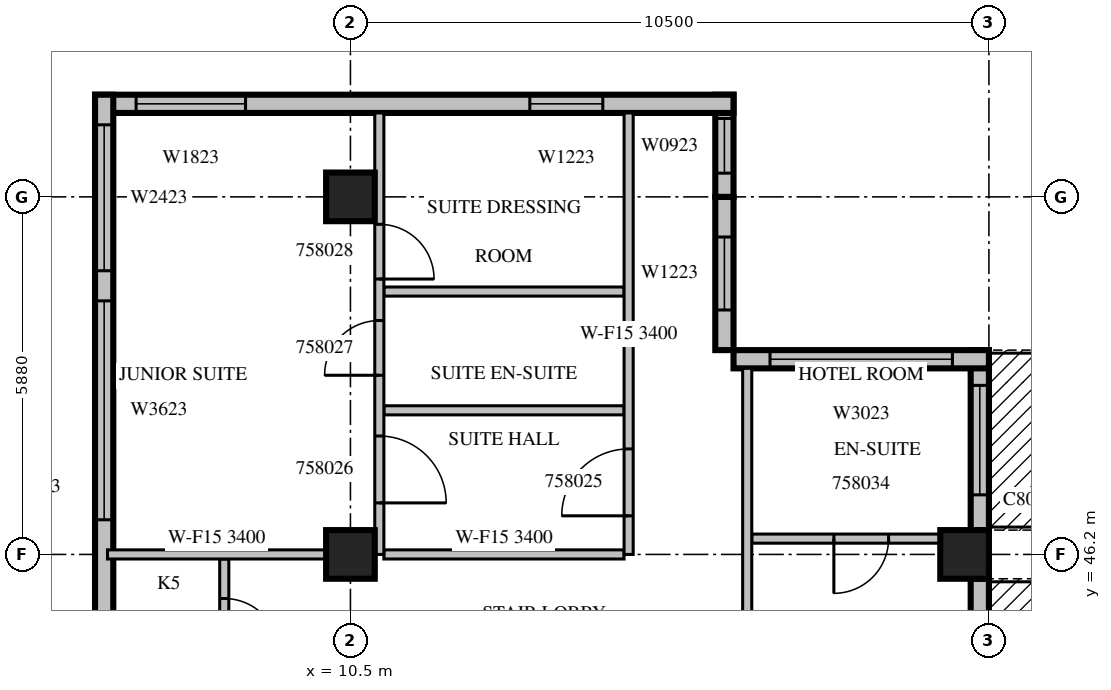
"""IFC4 building model, lengths in metres.
Left out: names, types, materials, properties, quantities, classifications, styles, units other than length and angle.
Written with IfcOpenShell. Run it as: python <this file> out.ifc"""

import sys

from ifc_helpers import new_model, si_unit, direction, frame, frame_2d, origin, origin_2d, place, context, subcontext, project, spatial, rectangle, extrude, source, transform, mapped, element, fill, save


model = new_model("IFC4")
c1 = context("Model", 3, precision=1e-05, world=origin(), true_north=direction((0.0, 1.0)))
c2 = subcontext(c1, "Body", "Model", "MODEL_VIEW")
j1 = project(units=[si_unit("LENGTHUNIT", "METRE"), si_unit("PLANEANGLEUNIT", "RADIAN")], contexts=[c1])
p1 = place(None, origin())
s1 = spatial("IfcSite", under=j1, at=p1, CompositionType="ELEMENT")
p2 = place(p1, origin())
s2 = spatial("IfcBuilding", under=s1, at=p2, CompositionType="ELEMENT")
p3 = place(p2, frame((0.0, 0.0, 253.8)))
s3 = spatial("IfcBuildingStorey", under=s2, at=p3, CompositionType="ELEMENT", Elevation=253.8)
m1 = source(origin(), c2, "Body", "SweptSolid", [
    extrude(rectangle(XDim=0.8, YDim=0.8, at=origin_2d()), origin(), (0.0, 0.0, 1.0), 3.8),
])
for number, where, z_axis, x_axis in (
    (1, (10.5, 46.2, 0.0), (0.0, 0.0, 1.0), (1.0, 0.0, 0.0)),
    (2, (20.6, 46.2, 0.0), (0.0, 0.0, 1.0), (1.0, 0.0, 0.0)),
    (3, (10.5, 52.08, 0.0), (0.0, 0.0, 1.0), (1.0, 0.0, 0.0)),
):
    element("IfcColumn", number, at=place(p3, frame(where, z_axis=z_axis, x_axis=x_axis)), inside=s3, PredefinedType="COLUMN", context=c2, shape_type="MappedRepresentation", body=[
        mapped(m1, transform((0.0, 0.0, 0.0), scale=1.0)),
    ])
m2 = source(origin(), c2, "Body", "SweptSolid", [
    extrude(rectangle(XDim=3.8, YDim=0.3, at=frame_2d((1.9, 0.0))), origin(), (0.0, 0.0, 1.0), 3.4),
])
p4 = place(p3, frame((20.85, 42.0, 0.0), z_axis=(0.0, 0.0, 1.0), x_axis=(0.0, 1.0, 0.0)))
e4 = element("IfcWall", 4, at=p4, inside=s3, PredefinedType="STANDARD", context=c2, shape_type="MappedRepresentation", body=[
    mapped(m2, transform((0.0, 0.0, 0.0), scale=1.0)),
])
m3 = source(origin(), c2, "Body", "SweptSolid", [
    extrude(rectangle(XDim=1.8, YDim=2.4, at=frame_2d((0.9, 1.2))), frame((0.0, 0.16, 0.0), z_axis=(0.0, -1.0, 0.0), x_axis=(1.0, 0.0, 0.0)), (0.0, 0.0, 1.0), 0.32),
])
p5 = place(p4, frame((1.0, 0.0, 0.0)))
e5 = element("IfcOpeningElement", 5, at=p5, cuts=e4, PredefinedType="OPENING", context=c2, shape_type="MappedRepresentation", body=[
    mapped(m3, transform((0.0, 0.0, 0.0), scale=1.0)),
])
m4 = source(origin(), c2, "Body", "SweptSolid", [
    extrude(rectangle(XDim=2.96, YDim=0.3, at=frame_2d((1.48, 0.0))), origin(), (0.0, 0.0, 1.0), 3.4),
])
p6 = place(p3, frame((20.85, 46.6, 0.0), z_axis=(0.0, 0.0, 1.0), x_axis=(0.0, 1.0, 0.0)))
e6 = element("IfcWall", 6, at=p6, inside=s3, PredefinedType="STANDARD", context=c2, shape_type="MappedRepresentation", body=[
    mapped(m4, transform((0.0, 0.0, 0.0), scale=1.0)),
])
p7 = place(p6, frame((0.58, 0.0, 0.0)))
e7 = element("IfcOpeningElement", 7, at=p7, cuts=e6, PredefinedType="OPENING", context=c2, shape_type="MappedRepresentation", body=[
    mapped(m3, transform((0.0, 0.0, 0.0), scale=1.0)),
])
m5 = source(origin(), c2, "Body", "SweptSolid", [
    extrude(rectangle(XDim=4.2, YDim=0.3, at=frame_2d((2.1, 0.0))), origin(), (0.0, 0.0, 1.0), 3.4),
])
p8 = place(p3, frame((21.0, 49.41, 0.0), z_axis=(0.0, 0.0, 1.0), x_axis=(-1.0, 0.0, 0.0)))
e8 = element("IfcWall", 8, at=p8, inside=s3, PredefinedType="STANDARD", context=c2, shape_type="MappedRepresentation", body=[
    mapped(m5, transform((0.0, 0.0, 0.0), scale=1.0)),
])
m6 = source(origin(), c2, "Body", "SweptSolid", [
    extrude(rectangle(XDim=3.0, YDim=2.3, at=frame_2d((1.5, 1.15))), frame((0.0, 0.16, 0.0), z_axis=(0.0, -1.0, 0.0), x_axis=(1.0, 0.0, 0.0)), (0.0, 0.0, 1.0), 0.32),
])
p9 = place(p8, frame((0.6, 0.0, 0.6)))
e9 = element("IfcOpeningElement", 9, at=p9, cuts=e8, PredefinedType="OPENING", context=c2, shape_type="MappedRepresentation", body=[
    mapped(m6, transform((0.0, 0.0, 0.0), scale=1.0)),
])
m7 = source(origin(), c2, "Body", "SweptSolid", [
    extrude(rectangle(XDim=2.52, YDim=0.3, at=frame_2d((1.26, 0.0))), origin(), (0.0, 0.0, 1.0), 3.4),
])
p10 = place(p3, frame((16.65, 49.56, 0.0), z_axis=(0.0, 0.0, 1.0), x_axis=(0.0, 1.0, 0.0)))
e10 = element("IfcWall", 10, at=p10, inside=s3, PredefinedType="STANDARD", context=c2, shape_type="MappedRepresentation", body=[
    mapped(m7, transform((0.0, 0.0, 0.0), scale=1.0)),
])
m8 = source(origin(), c2, "Body", "SweptSolid", [
    extrude(rectangle(XDim=1.2, YDim=2.3, at=frame_2d((0.6, 1.15))), frame((0.0, 0.16, 0.0), z_axis=(0.0, -1.0, 0.0), x_axis=(1.0, 0.0, 0.0)), (0.0, 0.0, 1.0), 0.32),
])
p11 = place(p10, frame((0.66, 0.0, 0.6)))
e11 = element("IfcOpeningElement", 11, at=p11, cuts=e10, PredefinedType="OPENING", context=c2, shape_type="MappedRepresentation", body=[
    mapped(m8, transform((0.0, 0.0, 0.0), scale=1.0)),
])
m9 = source(origin(), c2, "Body", "SweptSolid", [
    extrude(rectangle(XDim=1.68, YDim=0.3, at=frame_2d((0.84, 0.0))), origin(), (0.0, 0.0, 1.0), 3.4),
])
p12 = place(p3, frame((16.65, 52.08, 0.0), z_axis=(0.0, 0.0, 1.0), x_axis=(0.0, 1.0, 0.0)))
e12 = element("IfcWall", 12, at=p12, inside=s3, PredefinedType="STANDARD", context=c2, shape_type="MappedRepresentation", body=[
    mapped(m9, transform((0.0, 0.0, 0.0), scale=1.0)),
])
m10 = source(origin(), c2, "Body", "SweptSolid", [
    extrude(rectangle(XDim=0.9, YDim=2.3, at=frame_2d((0.45, 1.15))), frame((0.0, 0.16, 0.0), z_axis=(0.0, -1.0, 0.0), x_axis=(1.0, 0.0, 0.0)), (0.0, 0.0, 1.0), 0.32),
])
p13 = place(p12, frame((0.39, 0.0, 0.6)))
e13 = element("IfcOpeningElement", 13, at=p13, cuts=e12, PredefinedType="OPENING", context=c2, shape_type="MappedRepresentation", body=[
    mapped(m10, transform((0.0, 0.0, 0.0), scale=1.0)),
])
m11 = source(origin(), c2, "Body", "SweptSolid", [
    extrude(rectangle(XDim=10.5, YDim=0.3, at=frame_2d((5.25, 0.0))), origin(), (0.0, 0.0, 1.0), 3.4),
])
p14 = place(p3, frame((16.8, 53.61, 0.0), z_axis=(0.0, 0.0, 1.0), x_axis=(-1.0, 0.0, 0.0)))
e14 = element("IfcWall", 14, at=p14, inside=s3, PredefinedType="STANDARD", context=c2, shape_type="MappedRepresentation", body=[
    mapped(m11, transform((0.0, 0.0, 0.0), scale=1.0)),
])
p15 = place(p14, frame((2.15, 0.0, 0.6)))
e15 = element("IfcOpeningElement", 15, at=p15, cuts=e14, PredefinedType="OPENING", context=c2, shape_type="MappedRepresentation", body=[
    mapped(m8, transform((0.0, 0.0, 0.0), scale=1.0)),
])
m12 = source(origin(), c2, "Body", "SweptSolid", [
    extrude(rectangle(XDim=1.8, YDim=2.3, at=frame_2d((0.9, 1.15))), frame((0.0, 0.16, 0.0), z_axis=(0.0, -1.0, 0.0), x_axis=(1.0, 0.0, 0.0)), (0.0, 0.0, 1.0), 0.32),
])
p16 = place(p14, frame((8.025, 0.0, 0.6)))
e16 = element("IfcOpeningElement", 16, at=p16, cuts=e14, PredefinedType="OPENING", context=c2, shape_type="MappedRepresentation", body=[
    mapped(m12, transform((0.0, 0.0, 0.0), scale=1.0)),
])
m13 = source(origin(), c2, "Body", "SweptSolid", [
    extrude(rectangle(XDim=9.91, YDim=0.3, at=frame_2d((4.955, 0.0))), origin(), (0.0, 0.0, 1.0), 3.4),
])
p17 = place(p3, frame((6.45, 53.76, 0.0), z_axis=(0.0, 0.0, 1.0), x_axis=(0.0, -1.0, 0.0)))
e17 = element("IfcWall", 17, at=p17, inside=s3, PredefinedType="STANDARD", context=c2, shape_type="MappedRepresentation", body=[
    mapped(m13, transform((0.0, 0.0, 0.0), scale=1.0)),
])
m14 = source(origin(), c2, "Body", "SweptSolid", [
    extrude(rectangle(XDim=3.6, YDim=2.3, at=frame_2d((1.8, 1.15))), frame((0.0, 0.16, 0.0), z_axis=(0.0, -1.0, 0.0), x_axis=(1.0, 0.0, 0.0)), (0.0, 0.0, 1.0), 0.32),
])
p18 = place(p17, frame((3.39, 0.0, 0.6)))
e18 = element("IfcOpeningElement", 18, at=p18, cuts=e17, PredefinedType="OPENING", context=c2, shape_type="MappedRepresentation", body=[
    mapped(m14, transform((0.0, 0.0, 0.0), scale=1.0)),
])
m15 = source(origin(), c2, "Body", "SweptSolid", [
    extrude(rectangle(XDim=2.4, YDim=2.3, at=frame_2d((1.2, 1.15))), frame((0.0, 0.16, 0.0), z_axis=(0.0, -1.0, 0.0), x_axis=(1.0, 0.0, 0.0)), (0.0, 0.0, 1.0), 0.32),
])
p19 = place(p17, frame((0.495, 0.0, 0.6)))
e19 = element("IfcOpeningElement", 19, at=p19, cuts=e17, PredefinedType="OPENING", context=c2, shape_type="MappedRepresentation", body=[
    mapped(m15, transform((0.0, 0.0, 0.0), scale=1.0)),
])
m16 = source(origin(), c2, "Body", "SweptSolid", [
    extrude(rectangle(XDim=2.2, YDim=0.15, at=frame_2d((1.1, 0.0))), origin(), (0.0, 0.0, 1.0), 3.4),
])
p20 = place(p3, frame((8.425, 43.925, 0.0), z_axis=(0.0, 0.0, 1.0), x_axis=(0.0, 1.0, 0.0)))
e20 = element("IfcWall", 20, at=p20, inside=s3, PredefinedType="PARTITIONING", context=c2, shape_type="MappedRepresentation", body=[
    mapped(m16, transform((0.0, 0.0, 0.0), scale=1.0)),
])
m17 = source(origin(), c2, "Body", "SweptSolid", [
    extrude(rectangle(XDim=0.9, YDim=2.1, at=frame_2d((0.45, 1.05))), frame((0.0, 0.085, 0.0), z_axis=(0.0, -1.0, 0.0), x_axis=(1.0, 0.0, 0.0)), (0.0, 0.0, 1.0), 0.17),
])
p21 = place(p20, frame((0.65, 0.0, 0.0)))
e21 = element("IfcOpeningElement", 21, at=p21, cuts=e20, PredefinedType="OPENING", context=c2, shape_type="MappedRepresentation", body=[
    mapped(m17, transform((0.0, 0.0, 0.0), scale=1.0)),
])
m18 = source(origin(), c2, "Body", "SweptSolid", [
    extrude(rectangle(XDim=3.95, YDim=0.15, at=frame_2d((1.975, 0.0))), origin(), (0.0, 0.0, 1.0), 3.4),
])
for number, where, z_axis, x_axis in (
    (22, (15.0, 48.57, 0.0), (0.0, 0.0, 1.0), (-1.0, 0.0, 0.0)),
    (23, (15.0, 50.523, 0.0), (0.0, 0.0, 1.0), (-1.0, 0.0, 0.0)),
):
    element("IfcWall", number, at=place(p3, frame(where, z_axis=z_axis, x_axis=x_axis)), inside=s3, PredefinedType="PARTITIONING", context=c2, shape_type="MappedRepresentation", body=[
        mapped(m18, transform((0.0, 0.0, 0.0), scale=1.0)),
    ])
m19 = source(origin(), c2, "Body", "SweptSolid", [
    extrude(rectangle(XDim=3.596, YDim=0.15, at=frame_2d((1.798, 0.0))), origin(), (0.0, 0.0, 1.0), 3.4),
])
p22 = place(p3, frame((10.101, 46.2, 0.0), z_axis=(0.0, 0.0, 1.0), x_axis=(-1.0, 0.0, 0.0)))
e24 = element("IfcWall", 24, at=p22, inside=s3, PredefinedType="PARTITIONING", context=c2, shape_type="MappedRepresentation", body=[
    mapped(m19, transform((0.0, 0.0, 0.0), scale=1.0)),
])
p23 = place(p3, frame((15.0, 46.2, 0.0), z_axis=(0.0, 0.0, 1.0), x_axis=(-1.0, 0.0, 0.0)))
e25 = element("IfcWall", 25, at=p23, inside=s3, PredefinedType="PARTITIONING", context=c2, shape_type="MappedRepresentation", body=[
    mapped(m18, transform((0.0, 0.0, 0.0), scale=1.0)),
])
m20 = source(origin(), c2, "Body", "SweptSolid", [
    extrude(rectangle(XDim=7.26, YDim=0.15, at=frame_2d((3.63, 0.0))), origin(), (0.0, 0.0, 1.0), 3.4),
])
p24 = place(p3, frame((10.975, 46.2, 0.0), z_axis=(0.0, 0.0, 1.0), x_axis=(0.0, 1.0, 0.0)))
e26 = element("IfcWall", 26, at=p24, inside=s3, PredefinedType="PARTITIONING", context=c2, shape_type="MappedRepresentation", body=[
    mapped(m20, transform((0.0, 0.0, 0.0), scale=1.0)),
])
m21 = source(origin(), c2, "Body", "SweptSolid", [
    extrude(rectangle(XDim=1.1, YDim=2.1, at=frame_2d((0.55, 1.05))), frame((0.0, 0.085, 0.0), z_axis=(0.0, -1.0, 0.0), x_axis=(1.0, 0.0, 0.0)), (0.0, 0.0, 1.0), 0.17),
])
p25 = place(p24, frame((0.847, 0.0, 0.0)))
e27 = element("IfcOpeningElement", 27, at=p25, cuts=e26, PredefinedType="OPENING", context=c2, shape_type="MappedRepresentation", body=[
    mapped(m21, transform((0.0, 0.0, 0.0), scale=1.0)),
])
p26 = place(p24, frame((2.946, 0.0, 0.0)))
e28 = element("IfcOpeningElement", 28, at=p26, cuts=e26, PredefinedType="OPENING", context=c2, shape_type="MappedRepresentation", body=[
    mapped(m17, transform((0.0, 0.0, 0.0), scale=1.0)),
])
p27 = place(p24, frame((4.529, 0.0, 0.0)))
e29 = element("IfcOpeningElement", 29, at=p27, cuts=e26, PredefinedType="OPENING", context=c2, shape_type="MappedRepresentation", body=[
    mapped(m17, transform((0.0, 0.0, 0.0), scale=1.0)),
])
m22 = source(origin(), c2, "Body", "SweptSolid", [
    extrude(rectangle(XDim=3.101, YDim=0.15, at=frame_2d((1.55, 0.0))), origin(), (0.0, 0.0, 1.0), 3.4),
])
p28 = place(p3, frame((17.1, 46.46, 0.0), z_axis=(0.0, 0.0, 1.0), x_axis=(1.0, 0.0, 0.0)))
e30 = element("IfcWall", 30, at=p28, inside=s3, PredefinedType="PARTITIONING", context=c2, shape_type="MappedRepresentation", body=[
    mapped(m22, transform((0.0, 0.0, 0.0), scale=1.0)),
])
p29 = place(p28, frame((1.35, 0.0, 0.0)))
e31 = element("IfcOpeningElement", 31, at=p29, cuts=e30, PredefinedType="OPENING", context=c2, shape_type="MappedRepresentation", body=[
    mapped(m17, transform((0.0, 0.0, 0.0), scale=1.0)),
])
p30 = place(p3, frame((15.075, 46.2, 0.0), z_axis=(0.0, 0.0, 1.0), x_axis=(0.0, 1.0, 0.0)))
e32 = element("IfcWall", 32, at=p30, inside=s3, PredefinedType="PARTITIONING", context=c2, shape_type="MappedRepresentation", body=[
    mapped(m20, transform((0.0, 0.0, 0.0), scale=1.0)),
])
p31 = place(p30, frame((0.635, 0.0, 0.0)))
e33 = element("IfcOpeningElement", 33, at=p31, cuts=e32, PredefinedType="OPENING", context=c2, shape_type="MappedRepresentation", body=[
    mapped(m21, transform((0.0, 0.0, 0.0), scale=1.0)),
])
m23 = source(origin(), c2, "Body", "SweptSolid", [
    extrude(rectangle(XDim=19.86, YDim=0.15, at=frame_2d((9.93, 0.0))), origin(), (0.0, 0.0, 1.0), 2.9),
])
p32 = place(p3, frame((17.025, 49.26, 0.0), z_axis=(0.0, 0.0, 1.0), x_axis=(0.0, -1.0, 0.0)))
e34 = element("IfcWall", 34, at=p32, inside=s3, PredefinedType="PARTITIONING", context=c2, shape_type="MappedRepresentation", body=[
    mapped(m23, transform((0.0, 0.0, 0.0), scale=1.0)),
])
p33 = place(p32, frame((18.076, 0.0, 0.0)))
e35 = element("IfcOpeningElement", 35, at=p33, cuts=e34, PredefinedType="OPENING", context=c2, shape_type="MappedRepresentation", body=[
    mapped(m17, transform((0.0, 0.0, 0.0), scale=1.0)),
])
p34 = place(p32, frame((15.976, 0.0, 0.0)))
e36 = element("IfcOpeningElement", 36, at=p34, cuts=e34, PredefinedType="OPENING", context=c2, shape_type="MappedRepresentation", body=[
    mapped(m17, transform((0.0, 0.0, 0.0), scale=1.0)),
])
p35 = place(p32, frame((13.913, 0.0, 0.0)))
e37 = element("IfcOpeningElement", 37, at=p35, cuts=e34, PredefinedType="OPENING", context=c2, shape_type="MappedRepresentation", body=[
    mapped(m17, transform((0.0, 0.0, 0.0), scale=1.0)),
])
p36 = place(p32, frame((11.813, 0.0, 0.0)))
e38 = element("IfcOpeningElement", 38, at=p36, cuts=e34, PredefinedType="OPENING", context=c2, shape_type="MappedRepresentation", body=[
    mapped(m17, transform((0.0, 0.0, 0.0), scale=1.0)),
])
m24 = source(origin(), c2, "Body", "SweptSolid", [
    extrude(rectangle(XDim=1.0, YDim=2.1, at=frame_2d((0.5, 1.05))), frame((0.0, 0.085, 0.0), z_axis=(0.0, -1.0, 0.0), x_axis=(1.0, 0.0, 0.0)), (0.0, 0.0, 1.0), 0.17),
])
p37 = place(p32, frame((6.63, 0.0, 0.0)))
e39 = element("IfcOpeningElement", 39, at=p37, cuts=e34, PredefinedType="OPENING", context=c2, shape_type="MappedRepresentation", body=[
    mapped(m24, transform((0.0, 0.0, 0.0), scale=1.0)),
])
m25 = source(origin(), c2, "Body", "SweptSolid", [
    extrude(rectangle(XDim=1.8, YDim=2.4, at=frame_2d((0.9, 1.2))), frame((0.0, 0.025, 0.0), z_axis=(0.0, -1.0, 0.0), x_axis=(1.0, 0.0, 0.0)), (0.0, 0.0, 1.0), 0.05),
])
p38 = place(p7, origin())
e40 = element("IfcDoor", 40, at=p38, inside=s3, OperationType="SLIDING_TO_LEFT", PredefinedType="DOOR", context=c2, shape_type="MappedRepresentation", body=[
    mapped(m25, transform((0.0, 0.0, 0.0), scale=1.0)),
])
fill(e7, e40)
m26 = source(origin(), c2, "Body", "SweptSolid", [
    extrude(rectangle(XDim=3.0, YDim=2.3, at=frame_2d((1.5, 1.15))), frame((0.0, 0.03, 0.0), z_axis=(0.0, -1.0, 0.0), x_axis=(1.0, 0.0, 0.0)), (0.0, 0.0, 1.0), 0.06),
])
p39 = place(p9, origin())
e41 = element("IfcWindow", 41, at=p39, inside=s3, PartitioningType="SINGLE_PANEL", PredefinedType="WINDOW", context=c2, shape_type="MappedRepresentation", body=[
    mapped(m26, transform((0.0, 0.0, 0.0), scale=1.0)),
])
fill(e9, e41)
m27 = source(origin(), c2, "Body", "SweptSolid", [
    extrude(rectangle(XDim=1.2, YDim=2.3, at=frame_2d((0.6, 1.15))), frame((0.0, 0.03, 0.0), z_axis=(0.0, -1.0, 0.0), x_axis=(1.0, 0.0, 0.0)), (0.0, 0.0, 1.0), 0.06),
])
p40 = place(p11, origin())
e42 = element("IfcWindow", 42, at=p40, inside=s3, PartitioningType="SINGLE_PANEL", PredefinedType="WINDOW", context=c2, shape_type="MappedRepresentation", body=[
    mapped(m27, transform((0.0, 0.0, 0.0), scale=1.0)),
])
fill(e11, e42)
m28 = source(origin(), c2, "Body", "SweptSolid", [
    extrude(rectangle(XDim=0.9, YDim=2.3, at=frame_2d((0.45, 1.15))), frame((0.0, 0.03, 0.0), z_axis=(0.0, -1.0, 0.0), x_axis=(1.0, 0.0, 0.0)), (0.0, 0.0, 1.0), 0.06),
])
p41 = place(p13, origin())
e43 = element("IfcWindow", 43, at=p41, inside=s3, PartitioningType="SINGLE_PANEL", PredefinedType="WINDOW", context=c2, shape_type="MappedRepresentation", body=[
    mapped(m28, transform((0.0, 0.0, 0.0), scale=1.0)),
])
fill(e13, e43)
p42 = place(p15, origin())
e44 = element("IfcWindow", 44, at=p42, inside=s3, PartitioningType="SINGLE_PANEL", PredefinedType="WINDOW", context=c2, shape_type="MappedRepresentation", body=[
    mapped(m27, transform((0.0, 0.0, 0.0), scale=1.0)),
])
fill(e15, e44)
m29 = source(origin(), c2, "Body", "SweptSolid", [
    extrude(rectangle(XDim=1.8, YDim=2.3, at=frame_2d((0.9, 1.15))), frame((0.0, 0.03, 0.0), z_axis=(0.0, -1.0, 0.0), x_axis=(1.0, 0.0, 0.0)), (0.0, 0.0, 1.0), 0.06),
])
p43 = place(p16, origin())
e45 = element("IfcWindow", 45, at=p43, inside=s3, PartitioningType="SINGLE_PANEL", PredefinedType="WINDOW", context=c2, shape_type="MappedRepresentation", body=[
    mapped(m29, transform((0.0, 0.0, 0.0), scale=1.0)),
])
fill(e16, e45)
m30 = source(origin(), c2, "Body", "SweptSolid", [
    extrude(rectangle(XDim=3.6, YDim=2.3, at=frame_2d((1.8, 1.15))), frame((0.0, 0.03, 0.0), z_axis=(0.0, -1.0, 0.0), x_axis=(1.0, 0.0, 0.0)), (0.0, 0.0, 1.0), 0.06),
])
p44 = place(p18, origin())
e46 = element("IfcWindow", 46, at=p44, inside=s3, PartitioningType="SINGLE_PANEL", PredefinedType="WINDOW", context=c2, shape_type="MappedRepresentation", body=[
    mapped(m30, transform((0.0, 0.0, 0.0), scale=1.0)),
])
fill(e18, e46)
m31 = source(origin(), c2, "Body", "SweptSolid", [
    extrude(rectangle(XDim=2.4, YDim=2.3, at=frame_2d((1.2, 1.15))), frame((0.0, 0.03, 0.0), z_axis=(0.0, -1.0, 0.0), x_axis=(1.0, 0.0, 0.0)), (0.0, 0.0, 1.0), 0.06),
])
p45 = place(p19, origin())
e47 = element("IfcWindow", 47, at=p45, inside=s3, PartitioningType="SINGLE_PANEL", PredefinedType="WINDOW", context=c2, shape_type="MappedRepresentation", body=[
    mapped(m31, transform((0.0, 0.0, 0.0), scale=1.0)),
])
fill(e19, e47)
m32 = source(origin(), c2, "Body", "SweptSolid", [
    extrude(rectangle(XDim=0.9, YDim=2.1, at=frame_2d((0.45, 1.05))), frame((0.0, 0.025, 0.0), z_axis=(0.0, -1.0, 0.0), x_axis=(1.0, 0.0, 0.0)), (0.0, 0.0, 1.0), 0.05),
])
p46 = place(p21, origin())
e48 = element("IfcDoor", 48, at=p46, inside=s3, OperationType="SINGLE_SWING_RIGHT", PredefinedType="DOOR", context=c2, shape_type="MappedRepresentation", body=[
    mapped(m32, transform((0.0, 0.0, 0.0), scale=1.0)),
])
fill(e21, e48)
m33 = source(origin(), c2, "Body", "SweptSolid", [
    extrude(rectangle(XDim=1.1, YDim=2.1, at=frame_2d((0.55, 1.05))), frame((0.0, 0.025, 0.0), z_axis=(0.0, -1.0, 0.0), x_axis=(1.0, 0.0, 0.0)), (0.0, 0.0, 1.0), 0.05),
])
p47 = place(p31, origin())
e49 = element("IfcDoor", 49, at=p47, inside=s3, OperationType="SINGLE_SWING_LEFT", PredefinedType="DOOR", context=c2, shape_type="MappedRepresentation", body=[
    mapped(m33, transform((0.0, 0.0, 0.0), scale=1.0)),
])
fill(e33, e49)
p48 = place(p25, origin())
e50 = element("IfcDoor", 50, at=p48, inside=s3, OperationType="SINGLE_SWING_RIGHT", PredefinedType="DOOR", context=c2, shape_type="MappedRepresentation", body=[
    mapped(m33, transform((0.0, 0.0, 0.0), scale=1.0)),
])
fill(e27, e50)
p49 = place(p26, origin())
e51 = element("IfcDoor", 51, at=p49, inside=s3, OperationType="SINGLE_SWING_LEFT", PredefinedType="DOOR", context=c2, shape_type="MappedRepresentation", body=[
    mapped(m32, transform((0.0, 0.0, 0.0), scale=1.0)),
])
fill(e28, e51)
p50 = place(p27, origin())
e52 = element("IfcDoor", 52, at=p50, inside=s3, OperationType="SINGLE_SWING_RIGHT", PredefinedType="DOOR", context=c2, shape_type="MappedRepresentation", body=[
    mapped(m32, transform((0.0, 0.0, 0.0), scale=1.0)),
])
fill(e29, e52)
p51 = place(p29, origin())
e53 = element("IfcDoor", 53, at=p51, inside=s3, OperationType="SINGLE_SWING_RIGHT", PredefinedType="DOOR", context=c2, shape_type="MappedRepresentation", body=[
    mapped(m32, transform((0.0, 0.0, 0.0), scale=1.0)),
])
fill(e31, e53)
save(model, sys.argv[1])
